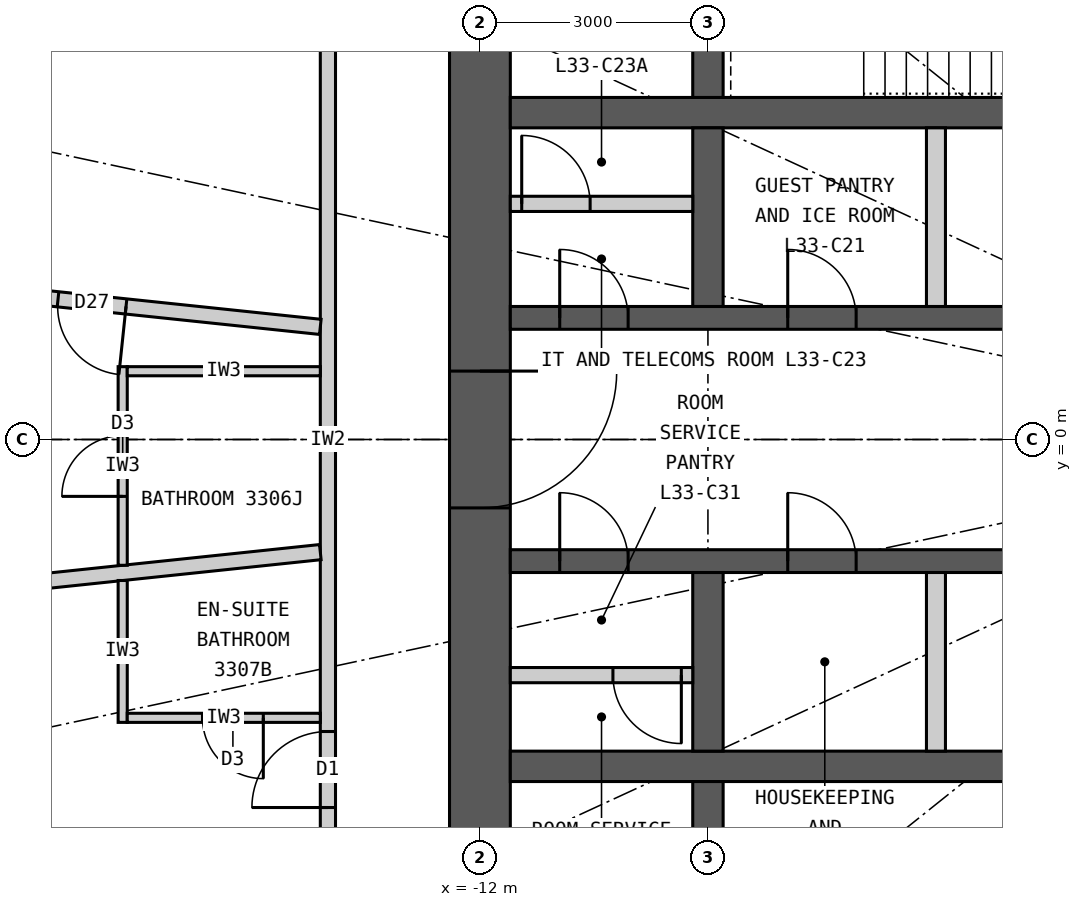
"""IFC4 building model, lengths in metres.
Left out: names, types, materials, properties, quantities, classifications, styles, units other than length and angle.
Written with IfcOpenShell. Run it as: python <this file> out.ifc"""

import sys

from ifc_helpers import new_model, si_unit, direction, frame, frame_2d, origin, place, context, subcontext, project, spatial, rectangle, extrude, element, fill, save


model = new_model("IFC4")
c1 = context("Model", 3, precision=1e-05, world=origin(), true_north=direction((0.0, 1.0)))
c2 = subcontext(c1, "Body", "Model", "MODEL_VIEW")
j1 = project(units=[si_unit("LENGTHUNIT", "METRE"), si_unit("PLANEANGLEUNIT", "RADIAN")], contexts=[c1])
p1 = place(None, origin())
s1 = spatial("IfcSite", under=j1, at=p1, CompositionType="ELEMENT")
p2 = place(p1, origin())
s2 = spatial("IfcBuilding", under=s1, at=p2, CompositionType="ELEMENT")
p3 = place(p2, frame((0.0, 0.0, 128.7)))
s3 = spatial("IfcBuildingStorey", under=s2, at=p3, CompositionType="ELEMENT", Elevation=128.7)
p4 = place(p3, frame((-12.0, 7.6, 0.0), z_axis=(0.0, 0.0, 1.0), x_axis=(0.0, -1.0, 0.0)))
e1 = element("IfcWall", 1, at=p4, inside=s3, PredefinedType="SHEAR", context=c2, shape_type="SweptSolid", body=[
    extrude(rectangle(XDim=15.2, YDim=0.8, at=frame_2d((7.6, 0.0))), origin(), (0.0, 0.0, 1.0), 3.3),
])
p5 = place(p4, frame((6.7, 0.0, 0.0)))
e2 = element("IfcOpeningElement", 2, at=p5, cuts=e1, PredefinedType="OPENING", context=c2, shape_type="SweptSolid", body=[
    extrude(rectangle(XDim=1.8, YDim=2.2, at=frame_2d((0.9, 1.1))), frame((0.0, 0.41, 0.0), z_axis=(0.0, -1.0, 0.0), x_axis=(1.0, 0.0, 0.0)), (0.0, 0.0, 1.0), 0.82),
])
p6 = place(p3, frame((-11.6, 4.3, 0.0), z_axis=(0.0, 0.0, 1.0), x_axis=(1.0, 0.0, 0.0)))
e3 = element("IfcWall", 3, at=p6, inside=s3, PredefinedType="SHEAR", context=c2, shape_type="SweptSolid", body=[
    extrude(rectangle(XDim=23.2, YDim=0.4, at=frame_2d((11.6, 0.0))), origin(), (0.0, 0.0, 1.0), 3.3),
])
p7 = place(p3, frame((-11.6, 1.6, 0.0), z_axis=(0.0, 0.0, 1.0), x_axis=(1.0, 0.0, 0.0)))
e4 = element("IfcWall", 4, at=p7, inside=s3, PredefinedType="SHEAR", context=c2, shape_type="SweptSolid", body=[
    extrude(rectangle(XDim=23.2, YDim=0.3, at=frame_2d((11.6, 0.0))), origin(), (0.0, 0.0, 1.0), 3.3),
])
p8 = place(p7, frame((6.55, 0.0, 0.0)))
e5 = element("IfcOpeningElement", 5, at=p8, cuts=e4, PredefinedType="OPENING", context=c2, shape_type="SweptSolid", body=[
    extrude(rectangle(XDim=1.1, YDim=2.2, at=frame_2d((0.55, 1.1))), frame((0.0, 0.16, 0.0), z_axis=(0.0, -1.0, 0.0), x_axis=(1.0, 0.0, 0.0)), (0.0, 0.0, 1.0), 0.32),
])
p9 = place(p7, frame((3.65, 0.0, 0.0)))
e6 = element("IfcOpeningElement", 6, at=p9, cuts=e4, PredefinedType="OPENING", context=c2, shape_type="SweptSolid", body=[
    extrude(rectangle(XDim=0.9, YDim=2.2, at=frame_2d((0.45, 1.1))), frame((0.0, 0.16, 0.0), z_axis=(0.0, -1.0, 0.0), x_axis=(1.0, 0.0, 0.0)), (0.0, 0.0, 1.0), 0.32),
])
p10 = place(p7, frame((21.65, 0.0, 0.0)))
e7 = element("IfcOpeningElement", 7, at=p10, cuts=e4, PredefinedType="OPENING", context=c2, shape_type="SweptSolid", body=[
    extrude(rectangle(XDim=0.9, YDim=2.2, at=frame_2d((0.45, 1.1))), frame((0.0, 0.16, 0.0), z_axis=(0.0, -1.0, 0.0), x_axis=(1.0, 0.0, 0.0)), (0.0, 0.0, 1.0), 0.32),
])
p11 = place(p7, frame((0.65, 0.0, 0.0)))
e8 = element("IfcOpeningElement", 8, at=p11, cuts=e4, PredefinedType="OPENING", context=c2, shape_type="SweptSolid", body=[
    extrude(rectangle(XDim=0.9, YDim=2.2, at=frame_2d((0.45, 1.1))), frame((0.0, 0.16, 0.0), z_axis=(0.0, -1.0, 0.0), x_axis=(1.0, 0.0, 0.0)), (0.0, 0.0, 1.0), 0.32),
])
p12 = place(p3, frame((-11.6, -4.3, 0.0), z_axis=(0.0, 0.0, 1.0), x_axis=(1.0, 0.0, 0.0)))
e9 = element("IfcWall", 9, at=p12, inside=s3, PredefinedType="SHEAR", context=c2, shape_type="SweptSolid", body=[
    extrude(rectangle(XDim=23.2, YDim=0.4, at=frame_2d((11.6, 0.0))), origin(), (0.0, 0.0, 1.0), 3.3),
])
p13 = place(p3, frame((-11.6, -1.6, 0.0), z_axis=(0.0, 0.0, 1.0), x_axis=(1.0, 0.0, 0.0)))
e10 = element("IfcWall", 10, at=p13, inside=s3, PredefinedType="SHEAR", context=c2, shape_type="SweptSolid", body=[
    extrude(rectangle(XDim=23.2, YDim=0.3, at=frame_2d((11.6, 0.0))), origin(), (0.0, 0.0, 1.0), 3.3),
])
p14 = place(p13, frame((6.55, 0.0, 0.0)))
e11 = element("IfcOpeningElement", 11, at=p14, cuts=e10, PredefinedType="OPENING", context=c2, shape_type="SweptSolid", body=[
    extrude(rectangle(XDim=1.1, YDim=2.2, at=frame_2d((0.55, 1.1))), frame((0.0, 0.16, 0.0), z_axis=(0.0, -1.0, 0.0), x_axis=(1.0, 0.0, 0.0)), (0.0, 0.0, 1.0), 0.32),
])
p15 = place(p13, frame((15.3, 0.0, 0.0)))
e12 = element("IfcOpeningElement", 12, at=p15, cuts=e10, PredefinedType="OPENING", context=c2, shape_type="SweptSolid", body=[
    extrude(rectangle(XDim=1.6, YDim=2.4, at=frame_2d((0.8, 1.2))), frame((0.0, 0.16, 0.0), z_axis=(0.0, -1.0, 0.0), x_axis=(1.0, 0.0, 0.0)), (0.0, 0.0, 1.0), 0.32),
])
p16 = place(p13, frame((0.65, 0.0, 0.0)))
e13 = element("IfcOpeningElement", 13, at=p16, cuts=e10, PredefinedType="OPENING", context=c2, shape_type="SweptSolid", body=[
    extrude(rectangle(XDim=0.9, YDim=2.2, at=frame_2d((0.45, 1.1))), frame((0.0, 0.16, 0.0), z_axis=(0.0, -1.0, 0.0), x_axis=(1.0, 0.0, 0.0)), (0.0, 0.0, 1.0), 0.32),
])
p17 = place(p13, frame((3.65, 0.0, 0.0)))
e14 = element("IfcOpeningElement", 14, at=p17, cuts=e10, PredefinedType="OPENING", context=c2, shape_type="SweptSolid", body=[
    extrude(rectangle(XDim=0.9, YDim=2.2, at=frame_2d((0.45, 1.1))), frame((0.0, 0.16, 0.0), z_axis=(0.0, -1.0, 0.0), x_axis=(1.0, 0.0, 0.0)), (0.0, 0.0, 1.0), 0.32),
])
p18 = place(p13, frame((21.65, 0.0, 0.0)))
e15 = element("IfcOpeningElement", 15, at=p18, cuts=e10, PredefinedType="OPENING", context=c2, shape_type="SweptSolid", body=[
    extrude(rectangle(XDim=0.9, YDim=2.2, at=frame_2d((0.45, 1.1))), frame((0.0, 0.16, 0.0), z_axis=(0.0, -1.0, 0.0), x_axis=(1.0, 0.0, 0.0)), (0.0, 0.0, 1.0), 0.32),
])
p19 = place(p3, frame((-9.0, 4.5, 0.0), z_axis=(0.0, 0.0, 1.0), x_axis=(0.0, 1.0, 0.0)))
e16 = element("IfcWall", 16, at=p19, inside=s3, PredefinedType="SHEAR", context=c2, shape_type="SweptSolid", body=[
    extrude(rectangle(XDim=3.1, YDim=0.4, at=frame_2d((1.55, 0.0))), origin(), (0.0, 0.0, 1.0), 3.3),
])
for number, where, z_axis, x_axis in (
    (17, (-9.0, 1.75, 0.0), (0.0, 0.0, 1.0), (0.0, 1.0, 0.0)),
    (18, (-9.0, -4.1, 0.0), (0.0, 0.0, 1.0), (0.0, 1.0, 0.0)),
):
    element("IfcWall", number, at=place(p3, frame(where, z_axis=z_axis, x_axis=x_axis)), inside=s3, PredefinedType="SHEAR", context=c2, shape_type="SweptSolid", body=[
        extrude(rectangle(XDim=2.35, YDim=0.4, at=frame_2d((1.175, 0.0))), origin(), (0.0, 0.0, 1.0), 3.3),
    ])
p20 = place(p3, frame((-9.0, -7.6, 0.0), z_axis=(0.0, 0.0, 1.0), x_axis=(0.0, 1.0, 0.0)))
e19 = element("IfcWall", 19, at=p20, inside=s3, PredefinedType="SHEAR", context=c2, shape_type="SweptSolid", body=[
    extrude(rectangle(XDim=3.1, YDim=0.4, at=frame_2d((1.55, 0.0))), origin(), (0.0, 0.0, 1.0), 3.3),
])
for number, where, z_axis, x_axis in (
    (20, (-6.0, 1.75, 0.0), (0.0, 0.0, 1.0), (0.0, 1.0, 0.0)),
    (21, (-6.0, -4.1, 0.0), (0.0, 0.0, 1.0), (0.0, 1.0, 0.0)),
):
    element("IfcWall", number, at=place(p3, frame(where, z_axis=z_axis, x_axis=x_axis)), inside=s3, PredefinedType="PARTITIONING", context=c2, shape_type="SweptSolid", body=[
        extrude(rectangle(XDim=2.35, YDim=0.25, at=frame_2d((1.175, 0.0))), origin(), (0.0, 0.0, 1.0), 3.3),
    ])
p21 = place(p3, frame((-14.0, 9.9, 0.0), z_axis=(0.0, 0.0, 1.0), x_axis=(0.0, -1.0, 0.0)))
e22 = element("IfcWall", 22, at=p21, inside=s3, PredefinedType="PARTITIONING", context=c2, shape_type="SweptSolid", body=[
    extrude(rectangle(XDim=19.8, YDim=0.2, at=frame_2d((9.9, 0.0))), origin(), (0.0, 0.0, 1.0), 3.12),
])
p22 = place(p21, frame((2.822, 0.0, 0.0)))
e23 = element("IfcOpeningElement", 23, at=p22, cuts=e22, PredefinedType="OPENING", context=c2, shape_type="SweptSolid", body=[
    extrude(rectangle(XDim=1.0, YDim=2.2, at=frame_2d((0.5, 1.1))), frame((0.0, 0.11, 0.0), z_axis=(0.0, -1.0, 0.0), x_axis=(1.0, 0.0, 0.0)), (0.0, 0.0, 1.0), 0.22),
])
p23 = place(p21, frame((13.742, 0.0, 0.0)))
e24 = element("IfcOpeningElement", 24, at=p23, cuts=e22, PredefinedType="OPENING", context=c2, shape_type="SweptSolid", body=[
    extrude(rectangle(XDim=1.0, YDim=2.2, at=frame_2d((0.5, 1.1))), frame((0.0, 0.11, 0.0), z_axis=(0.0, -1.0, 0.0), x_axis=(1.0, 0.0, 0.0)), (0.0, 0.0, 1.0), 0.22),
])
p24 = place(p21, frame((18.698, 0.0, 0.0)))
e25 = element("IfcOpeningElement", 25, at=p24, cuts=e22, PredefinedType="OPENING", context=c2, shape_type="SweptSolid", body=[
    extrude(rectangle(XDim=1.0, YDim=2.2, at=frame_2d((0.5, 1.1))), frame((0.0, 0.11, 0.0), z_axis=(0.0, -1.0, 0.0), x_axis=(1.0, 0.0, 0.0)), (0.0, 0.0, 1.0), 0.22),
])
p25 = place(p3, frame((-14.1, 1.482, 0.0), z_axis=(0.0, 0.0, 1.0), x_axis=(-0.994523202615, 0.104516024894, 0.0)))
e26 = element("IfcWall", 26, at=p25, inside=s3, PredefinedType="PARTITIONING", context=c2, shape_type="SweptSolid", body=[
    extrude(rectangle(XDim=10.091, YDim=0.2, at=frame_2d((5.045, 0.0))), origin(), (0.0, 0.0, 1.0), 2.47),
])
p26 = place(p25, frame((2.57, 0.0, 0.0)))
e27 = element("IfcOpeningElement", 27, at=p26, cuts=e26, PredefinedType="OPENING", context=c2, shape_type="SweptSolid", body=[
    extrude(rectangle(XDim=0.9, YDim=2.1, at=frame_2d((0.45, 1.05))), frame((0.0, 0.11, 0.0), z_axis=(0.0, -1.0, 0.0), x_axis=(1.0, 0.0, 0.0)), (0.0, 0.0, 1.0), 0.22),
])
p27 = place(p3, frame((-14.1, -1.482, 0.0), z_axis=(0.0, 0.0, 1.0), x_axis=(-0.994523202615, -0.104516024894, 0.0)))
e28 = element("IfcWall", 28, at=p27, inside=s3, PredefinedType="PARTITIONING", context=c2, shape_type="SweptSolid", body=[
    extrude(rectangle(XDim=10.091, YDim=0.2, at=frame_2d((5.045, 0.0))), origin(), (0.0, 0.0, 1.0), 2.47),
])
p28 = place(p3, frame((-16.7, -1.655, 0.0), z_axis=(0.0, 0.0, 1.0), x_axis=(0.0, 1.0, 0.0)))
e29 = element("IfcWall", 29, at=p28, inside=s3, PredefinedType="PARTITIONING", context=c2, shape_type="SweptSolid", body=[
    extrude(rectangle(XDim=2.613, YDim=0.12, at=frame_2d((1.307, 0.0))), origin(), (0.0, 0.0, 1.0), 3.12),
])
p29 = place(p28, frame((0.906, 0.0, 0.0)))
e30 = element("IfcOpeningElement", 30, at=p29, cuts=e29, PredefinedType="OPENING", context=c2, shape_type="SweptSolid", body=[
    extrude(rectangle(XDim=0.8, YDim=2.1, at=frame_2d((0.4, 1.05))), frame((0.0, 0.07, 0.0), z_axis=(0.0, -1.0, 0.0), x_axis=(1.0, 0.0, 0.0)), (0.0, 0.0, 1.0), 0.14),
])
p30 = place(p3, frame((-14.1, 0.898, 0.0), z_axis=(0.0, 0.0, 1.0), x_axis=(-1.0, 0.0, 0.0)))
e31 = element("IfcWall", 31, at=p30, inside=s3, PredefinedType="PARTITIONING", context=c2, shape_type="SweptSolid", body=[
    extrude(rectangle(XDim=2.54, YDim=0.12, at=frame_2d((1.27, 0.0))), origin(), (0.0, 0.0, 1.0), 3.12),
])
p31 = place(p3, frame((-16.7, -1.855, 0.0), z_axis=(0.0, 0.0, 1.0), x_axis=(0.0, -1.0, 0.0)))
e32 = element("IfcWall", 32, at=p31, inside=s3, PredefinedType="PARTITIONING", context=c2, shape_type="SweptSolid", body=[
    extrude(rectangle(XDim=1.867, YDim=0.12, at=frame_2d((0.933, 0.0))), origin(), (0.0, 0.0, 1.0), 3.12),
])
p32 = place(p3, frame((-14.1, -3.662, 0.0), z_axis=(0.0, 0.0, 1.0), x_axis=(-1.0, 0.0, 0.0)))
e33 = element("IfcWall", 33, at=p32, inside=s3, PredefinedType="PARTITIONING", context=c2, shape_type="SweptSolid", body=[
    extrude(rectangle(XDim=2.54, YDim=0.12, at=frame_2d((1.27, 0.0))), origin(), (0.0, 0.0, 1.0), 2.37),
])
p33 = place(p32, frame((0.75, 0.0, 0.0)))
e34 = element("IfcOpeningElement", 34, at=p33, cuts=e33, PredefinedType="OPENING", context=c2, shape_type="SweptSolid", body=[
    extrude(rectangle(XDim=0.8, YDim=2.1, at=frame_2d((0.4, 1.05))), frame((0.0, 0.07, 0.0), z_axis=(0.0, -1.0, 0.0), x_axis=(1.0, 0.0, 0.0)), (0.0, 0.0, 1.0), 0.14),
])
p34 = place(p3, frame((-11.6, -3.1, 0.0), z_axis=(0.0, 0.0, 1.0), x_axis=(1.0, 0.0, 0.0)))
e35 = element("IfcWall", 35, at=p34, inside=s3, PredefinedType="PARTITIONING", context=c2, shape_type="SweptSolid", body=[
    extrude(rectangle(XDim=2.4, YDim=0.2, at=frame_2d((1.2, 0.0))), origin(), (0.0, 0.0, 1.0), 3.12),
])
p35 = place(p34, frame((1.35, 0.0, 0.0)))
e36 = element("IfcOpeningElement", 36, at=p35, cuts=e35, PredefinedType="OPENING", context=c2, shape_type="SweptSolid", body=[
    extrude(rectangle(XDim=0.9, YDim=2.2, at=frame_2d((0.45, 1.1))), frame((0.0, 0.11, 0.0), z_axis=(0.0, -1.0, 0.0), x_axis=(1.0, 0.0, 0.0)), (0.0, 0.0, 1.0), 0.22),
])
p36 = place(p3, frame((-11.6, 3.1, 0.0), z_axis=(0.0, 0.0, 1.0), x_axis=(1.0, 0.0, 0.0)))
e37 = element("IfcWall", 37, at=p36, inside=s3, PredefinedType="PARTITIONING", context=c2, shape_type="SweptSolid", body=[
    extrude(rectangle(XDim=2.4, YDim=0.2, at=frame_2d((1.2, 0.0))), origin(), (0.0, 0.0, 1.0), 3.12),
])
p37 = place(p36, frame((0.15, 0.0, 0.0)))
e38 = element("IfcOpeningElement", 38, at=p37, cuts=e37, PredefinedType="OPENING", context=c2, shape_type="SweptSolid", body=[
    extrude(rectangle(XDim=0.9, YDim=2.2, at=frame_2d((0.45, 1.1))), frame((0.0, 0.11, 0.0), z_axis=(0.0, -1.0, 0.0), x_axis=(1.0, 0.0, 0.0)), (0.0, 0.0, 1.0), 0.22),
])
p38 = place(p29, origin())
e39 = element("IfcDoor", 39, at=p38, inside=s3, OperationType="SINGLE_SWING_LEFT", PredefinedType="DOOR", context=c2, shape_type="SweptSolid", body=[
    extrude(rectangle(XDim=0.8, YDim=2.1, at=frame_2d((0.4, 1.05))), frame((0.0, 0.025, 0.0), z_axis=(0.0, -1.0, 0.0), x_axis=(1.0, 0.0, 0.0)), (0.0, 0.0, 1.0), 0.05),
])
fill(e30, e39)
p39 = place(p26, origin())
e40 = element("IfcDoor", 40, at=p39, inside=s3, OperationType="SINGLE_SWING_LEFT", PredefinedType="DOOR", context=c2, shape_type="SweptSolid", body=[
    extrude(rectangle(XDim=0.9, YDim=2.1, at=frame_2d((0.45, 1.05))), frame((0.0, 0.025, 0.0), z_axis=(0.0, -1.0, 0.0), x_axis=(1.0, 0.0, 0.0)), (0.0, 0.0, 1.0), 0.05),
])
fill(e27, e40)
p40 = place(p33, origin())
e41 = element("IfcDoor", 41, at=p40, inside=s3, OperationType="SINGLE_SWING_LEFT", PredefinedType="DOOR", context=c2, shape_type="SweptSolid", body=[
    extrude(rectangle(XDim=0.8, YDim=2.1, at=frame_2d((0.4, 1.05))), frame((0.0, 0.025, 0.0), z_axis=(0.0, -1.0, 0.0), x_axis=(1.0, 0.0, 0.0)), (0.0, 0.0, 1.0), 0.05),
])
fill(e34, e41)
p41 = place(p23, origin())
e42 = element("IfcDoor", 42, at=p41, inside=s3, OperationType="SINGLE_SWING_RIGHT", PredefinedType="DOOR", context=c2, shape_type="SweptSolid", body=[
    extrude(rectangle(XDim=1.0, YDim=2.2, at=frame_2d((0.5, 1.1))), frame((0.0, 0.025, 0.0), z_axis=(0.0, -1.0, 0.0), x_axis=(1.0, 0.0, 0.0)), (0.0, 0.0, 1.0), 0.05),
])
fill(e24, e42)
p42 = place(p9, origin())
e43 = element("IfcDoor", 43, at=p42, inside=s3, OperationType="SINGLE_SWING_LEFT", PredefinedType="DOOR", context=c2, shape_type="SweptSolid", body=[
    extrude(rectangle(XDim=0.9, YDim=2.2, at=frame_2d((0.45, 1.1))), frame((0.0, 0.025, 0.0), z_axis=(0.0, -1.0, 0.0), x_axis=(1.0, 0.0, 0.0)), (0.0, 0.0, 1.0), 0.05),
])
fill(e6, e43)
p43 = place(p35, origin())
e44 = element("IfcDoor", 44, at=p43, inside=s3, OperationType="SINGLE_SWING_RIGHT", PredefinedType="DOOR", context=c2, shape_type="SweptSolid", body=[
    extrude(rectangle(XDim=0.9, YDim=2.2, at=frame_2d((0.45, 1.1))), frame((0.0, 0.025, 0.0), z_axis=(0.0, -1.0, 0.0), x_axis=(1.0, 0.0, 0.0)), (0.0, 0.0, 1.0), 0.05),
])
fill(e36, e44)
p44 = place(p16, origin())
e45 = element("IfcDoor", 45, at=p44, inside=s3, OperationType="SINGLE_SWING_LEFT", PredefinedType="DOOR", context=c2, shape_type="SweptSolid", body=[
    extrude(rectangle(XDim=0.9, YDim=2.2, at=frame_2d((0.45, 1.1))), frame((0.0, 0.025, 0.0), z_axis=(0.0, -1.0, 0.0), x_axis=(1.0, 0.0, 0.0)), (0.0, 0.0, 1.0), 0.05),
])
fill(e13, e45)
p45 = place(p17, origin())
e46 = element("IfcDoor", 46, at=p45, inside=s3, OperationType="SINGLE_SWING_LEFT", PredefinedType="DOOR", context=c2, shape_type="SweptSolid", body=[
    extrude(rectangle(XDim=0.9, YDim=2.2, at=frame_2d((0.45, 1.1))), frame((0.0, 0.025, 0.0), z_axis=(0.0, -1.0, 0.0), x_axis=(1.0, 0.0, 0.0)), (0.0, 0.0, 1.0), 0.05),
])
fill(e14, e46)
p46 = place(p11, origin())
e47 = element("IfcDoor", 47, at=p46, inside=s3, OperationType="SINGLE_SWING_LEFT", PredefinedType="DOOR", context=c2, shape_type="SweptSolid", body=[
    extrude(rectangle(XDim=0.9, YDim=2.2, at=frame_2d((0.45, 1.1))), frame((0.0, 0.025, 0.0), z_axis=(0.0, -1.0, 0.0), x_axis=(1.0, 0.0, 0.0)), (0.0, 0.0, 1.0), 0.05),
])
fill(e8, e47)
p47 = place(p37, origin())
e48 = element("IfcDoor", 48, at=p47, inside=s3, OperationType="SINGLE_SWING_LEFT", PredefinedType="DOOR", context=c2, shape_type="SweptSolid", body=[
    extrude(rectangle(XDim=0.9, YDim=2.2, at=frame_2d((0.45, 1.1))), frame((0.0, 0.025, 0.0), z_axis=(0.0, -1.0, 0.0), x_axis=(1.0, 0.0, 0.0)), (0.0, 0.0, 1.0), 0.05),
])
fill(e38, e48)
p48 = place(p5, origin())
e49 = element("IfcDoor", 49, at=p48, inside=s3, OperationType="DOUBLE_DOOR_DOUBLE_SWING", PredefinedType="DOOR", context=c2, shape_type="SweptSolid", body=[
    extrude(rectangle(XDim=1.8, YDim=2.2, at=frame_2d((0.9, 1.1))), frame((0.0, 0.025, 0.0), z_axis=(0.0, -1.0, 0.0), x_axis=(1.0, 0.0, 0.0)), (0.0, 0.0, 1.0), 0.05),
])
fill(e2, e49)
save(model, sys.argv[1])
